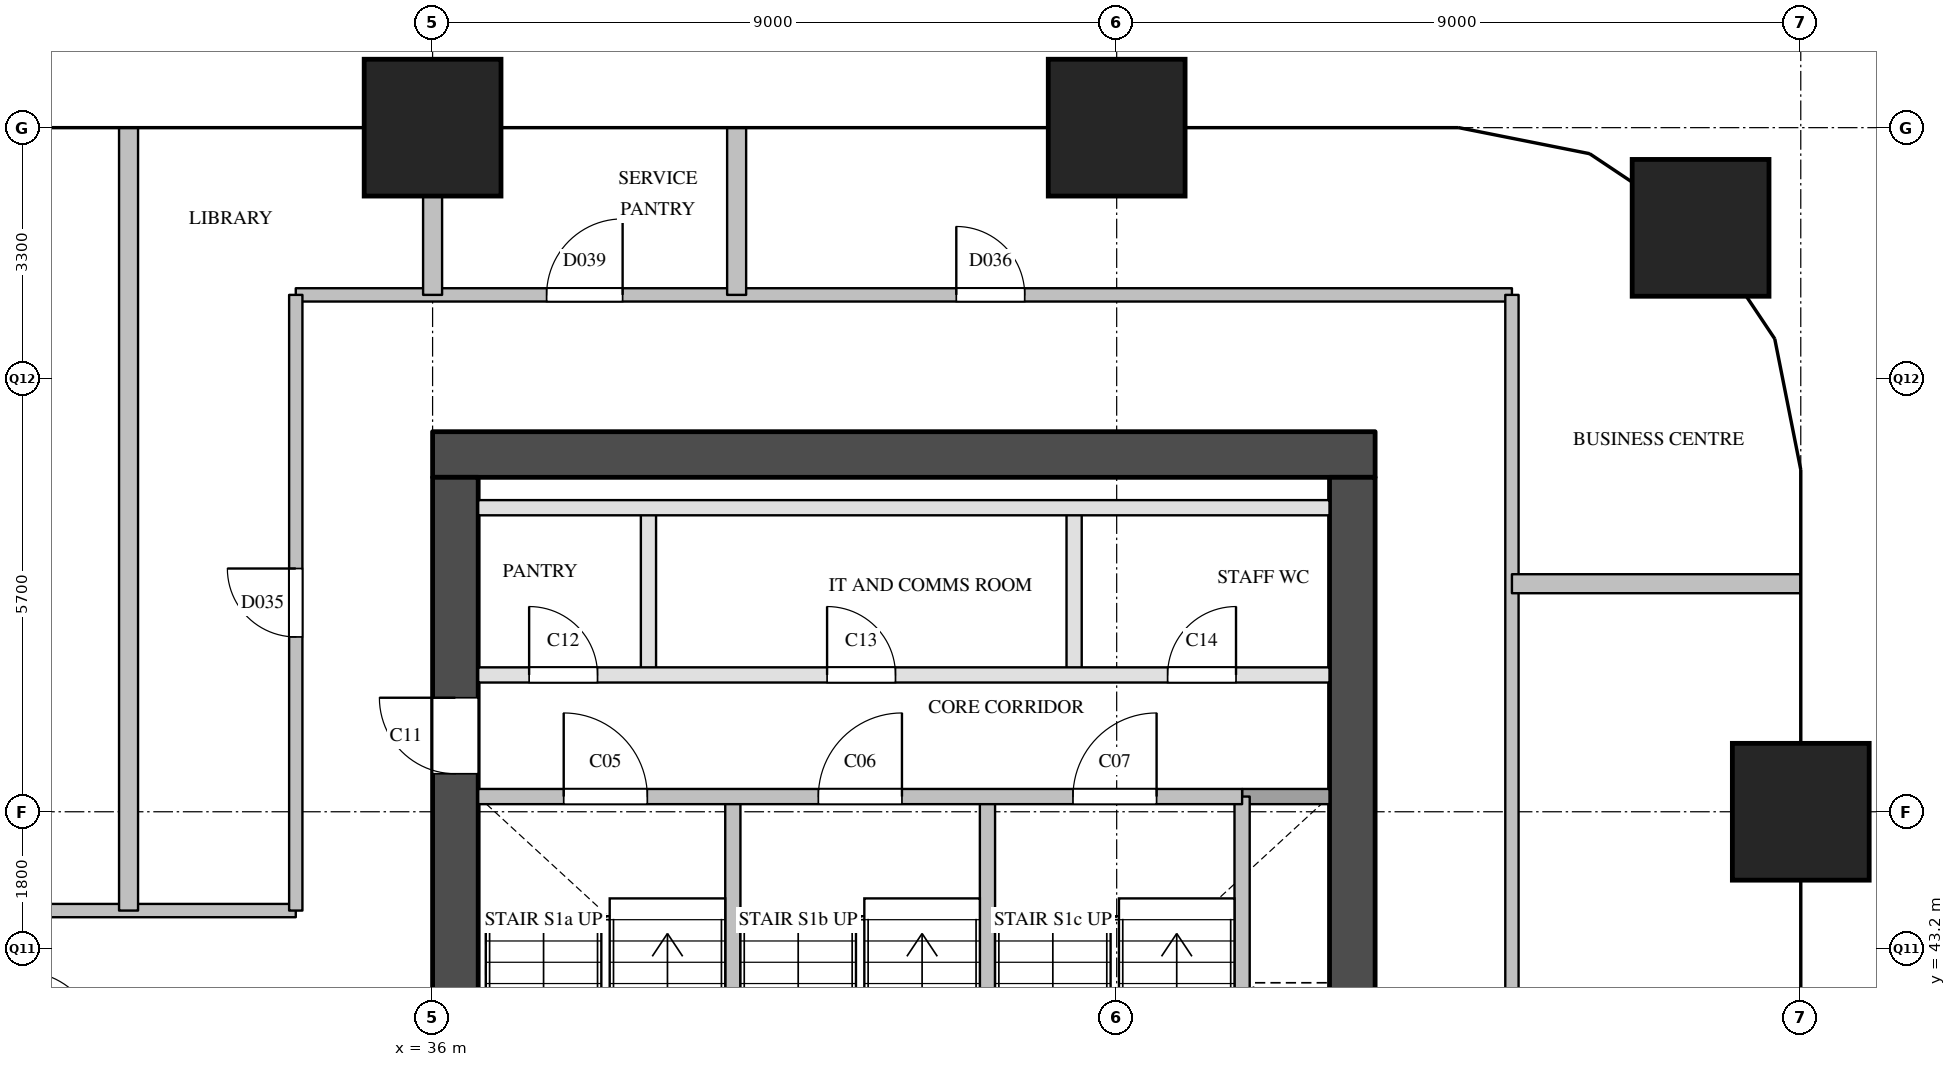
"""IFC4 building model, lengths in metres.
Left out: names, types, materials, properties, quantities, classifications, styles, units other than length and angle.
Written with IfcOpenShell. Run it as: python <this file> out.ifc"""

import sys

from ifc_helpers import new_model, si_unit, direction, frame, frame_2d, origin, origin_2d, place, context, subcontext, project, spatial, rectangle, extrude, element, fill, save


model = new_model("IFC4")
c1 = context("Model", 3, precision=1e-05, world=origin(), true_north=direction((0.0, 1.0)))
c2 = subcontext(c1, "Body", "Model", "MODEL_VIEW")
j1 = project(units=[si_unit("LENGTHUNIT", "METRE"), si_unit("PLANEANGLEUNIT", "RADIAN")], contexts=[c1])
p1 = place(None, origin())
s1 = spatial("IfcSite", under=j1, at=p1, CompositionType="ELEMENT")
p2 = place(p1, origin())
s2 = spatial("IfcBuilding", under=s1, at=p2, CompositionType="ELEMENT")
p3 = place(p2, frame((0.0, 0.0, 81.6)))
s3 = spatial("IfcBuildingStorey", under=s2, at=p3, CompositionType="ELEMENT", Elevation=81.6)
for number, where, z_axis, x_axis in (
    (1, (36.0, 54.0, 0.0), (0.0, 0.0, 1.0), (1.0, 0.0, 0.0)),
    (2, (45.0, 54.0, 0.0), (0.0, 0.0, 1.0), (1.0, 0.0, 0.0)),
    (3, (54.0, 45.0, 0.0), (0.0, 0.0, 1.0), (1.0, 0.0, 0.0)),
    (4, (52.682, 52.682, 0.0), (0.0, 0.0, 1.0), (1.0, 0.0, 0.0)),
):
    element("IfcColumn", number, at=place(p3, frame(where, z_axis=z_axis, x_axis=x_axis)), inside=s3, PredefinedType="COLUMN", context=c2, shape_type="SweptSolid", body=[
        extrude(rectangle(XDim=1.8, YDim=1.8, at=origin_2d()), origin(), (0.0, 0.0, 1.0), 3.8),
    ])
p4 = place(p3, frame((36.0, 49.7, 0.0), z_axis=(0.0, 0.0, 1.0), x_axis=(1.0, 0.0, 0.0)))
e5 = element("IfcWall", 5, at=p4, inside=s3, PredefinedType="SHEAR", context=c2, shape_type="SweptSolid", body=[
    extrude(rectangle(XDim=12.4, YDim=0.6, at=frame_2d((6.2, 0.0))), origin(), (0.0, 0.0, 1.0), 3.5),
])
p5 = place(p3, frame((36.3, 29.1, 0.0), z_axis=(0.0, 0.0, 1.0), x_axis=(0.0, 1.0, 0.0)))
e6 = element("IfcWall", 6, at=p5, inside=s3, PredefinedType="SHEAR", context=c2, shape_type="SweptSolid", body=[
    extrude(rectangle(XDim=20.3, YDim=0.6, at=frame_2d((10.15, 0.0))), origin(), (0.0, 0.0, 1.0), 3.5),
])
p6 = place(p5, frame((3.6, 0.0, 0.0)))
e7 = element("IfcOpeningElement", 7, at=p6, cuts=e6, PredefinedType="OPENING", context=c2, shape_type="SweptSolid", body=[
    extrude(rectangle(XDim=1.8, YDim=2.1, at=frame_2d((0.9, 1.05))), frame((0.0, 0.31, 0.0), z_axis=(0.0, -1.0, 0.0), x_axis=(1.0, 0.0, 0.0)), (0.0, 0.0, 1.0), 0.62),
])
p7 = place(p5, frame((16.4, 0.0, 0.0)))
e8 = element("IfcOpeningElement", 8, at=p7, cuts=e6, PredefinedType="OPENING", context=c2, shape_type="SweptSolid", body=[
    extrude(rectangle(XDim=1.0, YDim=2.1, at=frame_2d((0.5, 1.05))), frame((0.0, 0.31, 0.0), z_axis=(0.0, -1.0, 0.0), x_axis=(1.0, 0.0, 0.0)), (0.0, 0.0, 1.0), 0.62),
])
p8 = place(p3, frame((48.1, 29.1, 0.0), z_axis=(0.0, 0.0, 1.0), x_axis=(0.0, 1.0, 0.0)))
e9 = element("IfcWall", 9, at=p8, inside=s3, PredefinedType="SHEAR", context=c2, shape_type="SweptSolid", body=[
    extrude(rectangle(XDim=20.3, YDim=0.6, at=frame_2d((10.15, 0.0))), origin(), (0.0, 0.0, 1.0), 3.5),
])
p9 = place(p8, frame((12.5, 0.0, 0.0)))
e10 = element("IfcOpeningElement", 10, at=p9, cuts=e9, PredefinedType="OPENING", context=c2, shape_type="SweptSolid", body=[
    extrude(rectangle(XDim=0.7, YDim=2.1, at=frame_2d((0.35, 1.05))), frame((0.0, 0.31, 0.0), z_axis=(0.0, -1.0, 0.0), x_axis=(1.0, 0.0, 0.0)), (0.0, 0.0, 1.0), 0.62),
])
p10 = place(p8, frame((3.9, 0.0, 0.0)))
e11 = element("IfcOpeningElement", 11, at=p10, cuts=e9, PredefinedType="OPENING", context=c2, shape_type="SweptSolid", body=[
    extrude(rectangle(XDim=1.8, YDim=2.1, at=frame_2d((0.9, 1.05))), frame((0.0, 0.31, 0.0), z_axis=(0.0, -1.0, 0.0), x_axis=(1.0, 0.0, 0.0)), (0.0, 0.0, 1.0), 0.62),
])
p11 = place(p3, frame((38.84, 46.8, 0.0), z_axis=(0.0, 0.0, 1.0), x_axis=(0.0, 1.0, 0.0)))
e12 = element("IfcWall", 12, at=p11, inside=s3, PredefinedType="PARTITIONING", context=c2, shape_type="SweptSolid", body=[
    extrude(rectangle(XDim=2.2, YDim=0.2, at=frame_2d((1.1, 0.0))), origin(), (0.0, 0.0, 1.0), 3.5),
])
for number, where, z_axis, x_axis in (
    (13, (39.95, 40.78, 0.0), (0.0, 0.0, 1.0), (0.0, 1.0, 0.0)),
    (14, (43.3, 40.78, 0.0), (0.0, 0.0, 1.0), (0.0, 1.0, 0.0)),
):
    element("IfcWall", number, at=place(p3, frame(where, z_axis=z_axis, x_axis=x_axis)), inside=s3, PredefinedType="SOLIDWALL", context=c2, shape_type="SweptSolid", body=[
        extrude(rectangle(XDim=4.42, YDim=0.2, at=frame_2d((2.21, 0.0))), origin(), (0.0, 0.0, 1.0), 3.5),
    ])
p12 = place(p3, frame((44.44, 46.8, 0.0), z_axis=(0.0, 0.0, 1.0), x_axis=(0.0, 1.0, 0.0)))
e15 = element("IfcWall", 15, at=p12, inside=s3, PredefinedType="PARTITIONING", context=c2, shape_type="SweptSolid", body=[
    extrude(rectangle(XDim=2.2, YDim=0.2, at=frame_2d((1.1, 0.0))), origin(), (0.0, 0.0, 1.0), 3.5),
])
p13 = place(p3, frame((46.65, 40.78, 0.0), z_axis=(0.0, 0.0, 1.0), x_axis=(0.0, 1.0, 0.0)))
e16 = element("IfcWall", 16, at=p13, inside=s3, PredefinedType="SOLIDWALL", context=c2, shape_type="SweptSolid", body=[
    extrude(rectangle(XDim=4.42, YDim=0.2, at=frame_2d((2.21, 0.0))), origin(), (0.0, 0.0, 1.0), 3.5),
])
p14 = place(p3, frame((46.65, 45.2, 0.0), z_axis=(0.0, 0.0, 1.0), x_axis=(1.0, 0.0, 0.0)))
e17 = element("IfcWall", 17, at=p14, inside=s3, PredefinedType="SOLIDWALL", context=c2, shape_type="SweptSolid", body=[
    extrude(rectangle(XDim=1.15, YDim=0.2, at=frame_2d((0.575, 0.0))), origin(), (0.0, 0.0, 1.0), 3.5),
])
p15 = place(p3, frame((36.6, 45.2, 0.0), z_axis=(0.0, 0.0, 1.0), x_axis=(1.0, 0.0, 0.0)))
e18 = element("IfcWall", 18, at=p15, inside=s3, PredefinedType="SOLIDWALL", context=c2, shape_type="SweptSolid", body=[
    extrude(rectangle(XDim=10.05, YDim=0.2, at=frame_2d((5.025, 0.0))), origin(), (0.0, 0.0, 1.0), 3.5),
])
p16 = place(p15, frame((1.125, 0.0, 0.0)))
e19 = element("IfcOpeningElement", 19, at=p16, cuts=e18, PredefinedType="OPENING", context=c2, shape_type="SweptSolid", body=[
    extrude(rectangle(XDim=1.1, YDim=2.1, at=frame_2d((0.55, 1.05))), frame((0.0, 0.11, 0.0), z_axis=(0.0, -1.0, 0.0), x_axis=(1.0, 0.0, 0.0)), (0.0, 0.0, 1.0), 0.22),
])
p17 = place(p15, frame((4.475, 0.0, 0.0)))
e20 = element("IfcOpeningElement", 20, at=p17, cuts=e18, PredefinedType="OPENING", context=c2, shape_type="SweptSolid", body=[
    extrude(rectangle(XDim=1.1, YDim=2.1, at=frame_2d((0.55, 1.05))), frame((0.0, 0.11, 0.0), z_axis=(0.0, -1.0, 0.0), x_axis=(1.0, 0.0, 0.0)), (0.0, 0.0, 1.0), 0.22),
])
p18 = place(p15, frame((7.825, 0.0, 0.0)))
e21 = element("IfcOpeningElement", 21, at=p18, cuts=e18, PredefinedType="OPENING", context=c2, shape_type="SweptSolid", body=[
    extrude(rectangle(XDim=1.1, YDim=2.1, at=frame_2d((0.55, 1.05))), frame((0.0, 0.11, 0.0), z_axis=(0.0, -1.0, 0.0), x_axis=(1.0, 0.0, 0.0)), (0.0, 0.0, 1.0), 0.22),
])
p19 = place(p3, frame((36.6, 46.8, 0.0), z_axis=(0.0, 0.0, 1.0), x_axis=(1.0, 0.0, 0.0)))
e22 = element("IfcWall", 22, at=p19, inside=s3, PredefinedType="PARTITIONING", context=c2, shape_type="SweptSolid", body=[
    extrude(rectangle(XDim=11.2, YDim=0.2, at=frame_2d((5.6, 0.0))), origin(), (0.0, 0.0, 1.0), 3.5),
])
p20 = place(p19, frame((0.67, 0.0, 0.0)))
e23 = element("IfcOpeningElement", 23, at=p20, cuts=e22, PredefinedType="OPENING", context=c2, shape_type="SweptSolid", body=[
    extrude(rectangle(XDim=0.9, YDim=2.1, at=frame_2d((0.45, 1.05))), frame((0.0, 0.11, 0.0), z_axis=(0.0, -1.0, 0.0), x_axis=(1.0, 0.0, 0.0)), (0.0, 0.0, 1.0), 0.22),
])
p21 = place(p19, frame((4.59, 0.0, 0.0)))
e24 = element("IfcOpeningElement", 24, at=p21, cuts=e22, PredefinedType="OPENING", context=c2, shape_type="SweptSolid", body=[
    extrude(rectangle(XDim=0.9, YDim=2.1, at=frame_2d((0.45, 1.05))), frame((0.0, 0.11, 0.0), z_axis=(0.0, -1.0, 0.0), x_axis=(1.0, 0.0, 0.0)), (0.0, 0.0, 1.0), 0.22),
])
p22 = place(p19, frame((9.07, 0.0, 0.0)))
e25 = element("IfcOpeningElement", 25, at=p22, cuts=e22, PredefinedType="OPENING", context=c2, shape_type="SweptSolid", body=[
    extrude(rectangle(XDim=0.9, YDim=2.1, at=frame_2d((0.45, 1.05))), frame((0.0, 0.11, 0.0), z_axis=(0.0, -1.0, 0.0), x_axis=(1.0, 0.0, 0.0)), (0.0, 0.0, 1.0), 0.22),
])
p23 = place(p3, frame((36.6, 49.0, 0.0), z_axis=(0.0, 0.0, 1.0), x_axis=(1.0, 0.0, 0.0)))
e26 = element("IfcWall", 26, at=p23, inside=s3, PredefinedType="PARTITIONING", context=c2, shape_type="SweptSolid", body=[
    extrude(rectangle(XDim=11.2, YDim=0.2, at=frame_2d((5.6, 0.0))), origin(), (0.0, 0.0, 1.0), 3.5),
])
p24 = place(p3, frame((19.8, 43.7, 0.0), z_axis=(0.0, 0.0, 1.0), x_axis=(1.0, 0.0, 0.0)))
e27 = element("IfcWall", 27, at=p24, inside=s3, PredefinedType="PARTITIONING", context=c2, shape_type="SweptSolid", body=[
    extrude(rectangle(XDim=14.4, YDim=0.175, at=frame_2d((7.2, 0.0))), origin(), (0.0, 0.0, 1.0), 2.5),
])
p25 = place(p24, frame((3.49, 0.0, 0.0)))
e28 = element("IfcOpeningElement", 28, at=p25, cuts=e27, PredefinedType="OPENING", context=c2, shape_type="SweptSolid", body=[
    extrude(rectangle(XDim=0.9, YDim=2.1, at=frame_2d((0.45, 1.05))), frame((0.0, 0.097, 0.0), z_axis=(0.0, -1.0, 0.0), x_axis=(1.0, 0.0, 0.0)), (0.0, 0.0, 1.0), 0.195),
])
p26 = place(p3, frame((34.2, 51.8, 0.0), z_axis=(0.0, 0.0, 1.0), x_axis=(1.0, 0.0, 0.0)))
e29 = element("IfcWall", 29, at=p26, inside=s3, PredefinedType="PARTITIONING", context=c2, shape_type="SweptSolid", body=[
    extrude(rectangle(XDim=16.0, YDim=0.175, at=frame_2d((8.0, 0.0))), origin(), (0.0, 0.0, 1.0), 3.5),
])
p27 = place(p26, frame((8.69, 0.0, 0.0)))
e30 = element("IfcOpeningElement", 30, at=p27, cuts=e29, PredefinedType="OPENING", context=c2, shape_type="SweptSolid", body=[
    extrude(rectangle(XDim=0.9, YDim=2.1, at=frame_2d((0.45, 1.05))), frame((0.0, 0.097, 0.0), z_axis=(0.0, -1.0, 0.0), x_axis=(1.0, 0.0, 0.0)), (0.0, 0.0, 1.0), 0.195),
])
p28 = place(p26, frame((3.3, 0.0, 0.0)))
e31 = element("IfcOpeningElement", 31, at=p28, cuts=e29, PredefinedType="OPENING", context=c2, shape_type="SweptSolid", body=[
    extrude(rectangle(XDim=1.0, YDim=2.1, at=frame_2d((0.5, 1.05))), frame((0.0, 0.097, 0.0), z_axis=(0.0, -1.0, 0.0), x_axis=(1.0, 0.0, 0.0)), (0.0, 0.0, 1.0), 0.195),
])
p29 = place(p3, frame((34.2, 43.7, 0.0), z_axis=(0.0, 0.0, 1.0), x_axis=(0.0, 1.0, 0.0)))
e32 = element("IfcWall", 32, at=p29, inside=s3, PredefinedType="PARTITIONING", context=c2, shape_type="SweptSolid", body=[
    extrude(rectangle(XDim=8.1, YDim=0.175, at=frame_2d((4.05, 0.0))), origin(), (0.0, 0.0, 1.0), 3.5),
])
p30 = place(p29, frame((3.6, 0.0, 0.0)))
e33 = element("IfcOpeningElement", 33, at=p30, cuts=e32, PredefinedType="OPENING", context=c2, shape_type="SweptSolid", body=[
    extrude(rectangle(XDim=0.9, YDim=2.1, at=frame_2d((0.45, 1.05))), frame((0.0, 0.097, 0.0), z_axis=(0.0, -1.0, 0.0), x_axis=(1.0, 0.0, 0.0)), (0.0, 0.0, 1.0), 0.195),
])
p31 = place(p3, frame((50.2, 26.7, 0.0), z_axis=(0.0, 0.0, 1.0), x_axis=(0.0, 1.0, 0.0)))
e34 = element("IfcWall", 34, at=p31, inside=s3, PredefinedType="PARTITIONING", context=c2, shape_type="SweptSolid", body=[
    extrude(rectangle(XDim=25.1, YDim=0.175, at=frame_2d((12.55, 0.0))), origin(), (0.0, 0.0, 1.0), 2.5),
])
p32 = place(p31, frame((4.2, 0.0, 0.0)))
e35 = element("IfcOpeningElement", 35, at=p32, cuts=e34, PredefinedType="OPENING", context=c2, shape_type="SweptSolid", body=[
    extrude(rectangle(XDim=0.9, YDim=2.1, at=frame_2d((0.45, 1.05))), frame((0.0, 0.097, 0.0), z_axis=(0.0, -1.0, 0.0), x_axis=(1.0, 0.0, 0.0)), (0.0, 0.0, 1.0), 0.195),
])
p33 = place(p31, frame((14.85, 0.0, 0.0)))
e36 = element("IfcOpeningElement", 36, at=p33, cuts=e34, PredefinedType="OPENING", context=c2, shape_type="SweptSolid", body=[
    extrude(rectangle(XDim=0.9, YDim=2.1, at=frame_2d((0.45, 1.05))), frame((0.0, 0.097, 0.0), z_axis=(0.0, -1.0, 0.0), x_axis=(1.0, 0.0, 0.0)), (0.0, 0.0, 1.0), 0.195),
])
p34 = place(p3, frame((50.2, 48.0, 0.0), z_axis=(0.0, 0.0, 1.0), x_axis=(1.0, 0.0, 0.0)))
e37 = element("IfcWall", 37, at=p34, inside=s3, PredefinedType="PARTITIONING", context=c2, shape_type="SweptSolid", body=[
    extrude(rectangle(XDim=3.8, YDim=0.25, at=frame_2d((1.9, 0.0))), origin(), (0.0, 0.0, 1.0), 2.5),
])
p35 = place(p3, frame((32.0, 43.7, 0.0), z_axis=(0.0, 0.0, 1.0), x_axis=(0.0, 1.0, 0.0)))
e38 = element("IfcWall", 38, at=p35, inside=s3, PredefinedType="PARTITIONING", context=c2, shape_type="SweptSolid", body=[
    extrude(rectangle(XDim=10.3, YDim=0.25, at=frame_2d((5.15, 0.0))), origin(), (0.0, 0.0, 1.0), 2.5),
])
p36 = place(p3, frame((36.0, 51.8, 0.0), z_axis=(0.0, 0.0, 1.0), x_axis=(0.0, 1.0, 0.0)))
e39 = element("IfcWall", 39, at=p36, inside=s3, PredefinedType="PARTITIONING", context=c2, shape_type="SweptSolid", body=[
    extrude(rectangle(XDim=2.2, YDim=0.25, at=frame_2d((1.1, 0.0))), origin(), (0.0, 0.0, 1.0), 3.5),
])
p37 = place(p3, frame((40.0, 51.8, 0.0), z_axis=(0.0, 0.0, 1.0), x_axis=(0.0, 1.0, 0.0)))
e40 = element("IfcWall", 40, at=p37, inside=s3, PredefinedType="PARTITIONING", context=c2, shape_type="SweptSolid", body=[
    extrude(rectangle(XDim=2.2, YDim=0.25, at=frame_2d((1.1, 0.0))), origin(), (0.0, 0.0, 1.0), 2.5),
])
p38 = place(p16, origin())
e41 = element("IfcDoor", 41, at=p38, inside=s3, OperationType="SINGLE_SWING_LEFT", PredefinedType="DOOR", context=c2, shape_type="SweptSolid", body=[
    extrude(rectangle(XDim=1.1, YDim=2.1, at=frame_2d((0.55, 1.05))), frame((0.0, 0.025, 0.0), z_axis=(0.0, -1.0, 0.0), x_axis=(1.0, 0.0, 0.0)), (0.0, 0.0, 1.0), 0.05),
])
fill(e19, e41)
p39 = place(p17, origin())
e42 = element("IfcDoor", 42, at=p39, inside=s3, OperationType="SINGLE_SWING_RIGHT", PredefinedType="DOOR", context=c2, shape_type="SweptSolid", body=[
    extrude(rectangle(XDim=1.1, YDim=2.1, at=frame_2d((0.55, 1.05))), frame((0.0, 0.025, 0.0), z_axis=(0.0, -1.0, 0.0), x_axis=(1.0, 0.0, 0.0)), (0.0, 0.0, 1.0), 0.05),
])
fill(e20, e42)
p40 = place(p18, origin())
e43 = element("IfcDoor", 43, at=p40, inside=s3, OperationType="SINGLE_SWING_RIGHT", PredefinedType="DOOR", context=c2, shape_type="SweptSolid", body=[
    extrude(rectangle(XDim=1.1, YDim=2.1, at=frame_2d((0.55, 1.05))), frame((0.0, 0.025, 0.0), z_axis=(0.0, -1.0, 0.0), x_axis=(1.0, 0.0, 0.0)), (0.0, 0.0, 1.0), 0.05),
])
fill(e21, e43)
p41 = place(p7, origin())
e44 = element("IfcDoor", 44, at=p41, inside=s3, OperationType="SINGLE_SWING_RIGHT", PredefinedType="DOOR", context=c2, shape_type="SweptSolid", body=[
    extrude(rectangle(XDim=1.0, YDim=2.1, at=frame_2d((0.5, 1.05))), frame((0.0, 0.025, 0.0), z_axis=(0.0, -1.0, 0.0), x_axis=(1.0, 0.0, 0.0)), (0.0, 0.0, 1.0), 0.05),
])
fill(e8, e44)
p42 = place(p20, origin())
e45 = element("IfcDoor", 45, at=p42, inside=s3, OperationType="SINGLE_SWING_LEFT", PredefinedType="DOOR", context=c2, shape_type="SweptSolid", body=[
    extrude(rectangle(XDim=0.9, YDim=2.1, at=frame_2d((0.45, 1.05))), frame((0.0, 0.025, 0.0), z_axis=(0.0, -1.0, 0.0), x_axis=(1.0, 0.0, 0.0)), (0.0, 0.0, 1.0), 0.05),
])
fill(e23, e45)
p43 = place(p21, origin())
e46 = element("IfcDoor", 46, at=p43, inside=s3, OperationType="SINGLE_SWING_LEFT", PredefinedType="DOOR", context=c2, shape_type="SweptSolid", body=[
    extrude(rectangle(XDim=0.9, YDim=2.1, at=frame_2d((0.45, 1.05))), frame((0.0, 0.025, 0.0), z_axis=(0.0, -1.0, 0.0), x_axis=(1.0, 0.0, 0.0)), (0.0, 0.0, 1.0), 0.05),
])
fill(e24, e46)
p44 = place(p22, origin())
e47 = element("IfcDoor", 47, at=p44, inside=s3, OperationType="SINGLE_SWING_RIGHT", PredefinedType="DOOR", context=c2, shape_type="SweptSolid", body=[
    extrude(rectangle(XDim=0.9, YDim=2.1, at=frame_2d((0.45, 1.05))), frame((0.0, 0.025, 0.0), z_axis=(0.0, -1.0, 0.0), x_axis=(1.0, 0.0, 0.0)), (0.0, 0.0, 1.0), 0.05),
])
fill(e25, e47)
p45 = place(p30, origin())
e48 = element("IfcDoor", 48, at=p45, inside=s3, OperationType="SINGLE_SWING_RIGHT", PredefinedType="DOOR", context=c2, shape_type="SweptSolid", body=[
    extrude(rectangle(XDim=0.9, YDim=2.1, at=frame_2d((0.45, 1.05))), frame((0.0, 0.025, 0.0), z_axis=(0.0, -1.0, 0.0), x_axis=(1.0, 0.0, 0.0)), (0.0, 0.0, 1.0), 0.05),
])
fill(e33, e48)
p46 = place(p27, origin())
e49 = element("IfcDoor", 49, at=p46, inside=s3, OperationType="SINGLE_SWING_LEFT", PredefinedType="DOOR", context=c2, shape_type="SweptSolid", body=[
    extrude(rectangle(XDim=0.9, YDim=2.1, at=frame_2d((0.45, 1.05))), frame((0.0, 0.025, 0.0), z_axis=(0.0, -1.0, 0.0), x_axis=(1.0, 0.0, 0.0)), (0.0, 0.0, 1.0), 0.05),
])
fill(e30, e49)
p47 = place(p28, origin())
e50 = element("IfcDoor", 50, at=p47, inside=s3, OperationType="SINGLE_SWING_RIGHT", PredefinedType="DOOR", context=c2, shape_type="SweptSolid", body=[
    extrude(rectangle(XDim=1.0, YDim=2.1, at=frame_2d((0.5, 1.05))), frame((0.0, 0.025, 0.0), z_axis=(0.0, -1.0, 0.0), x_axis=(1.0, 0.0, 0.0)), (0.0, 0.0, 1.0), 0.05),
])
fill(e31, e50)
save(model, sys.argv[1])
